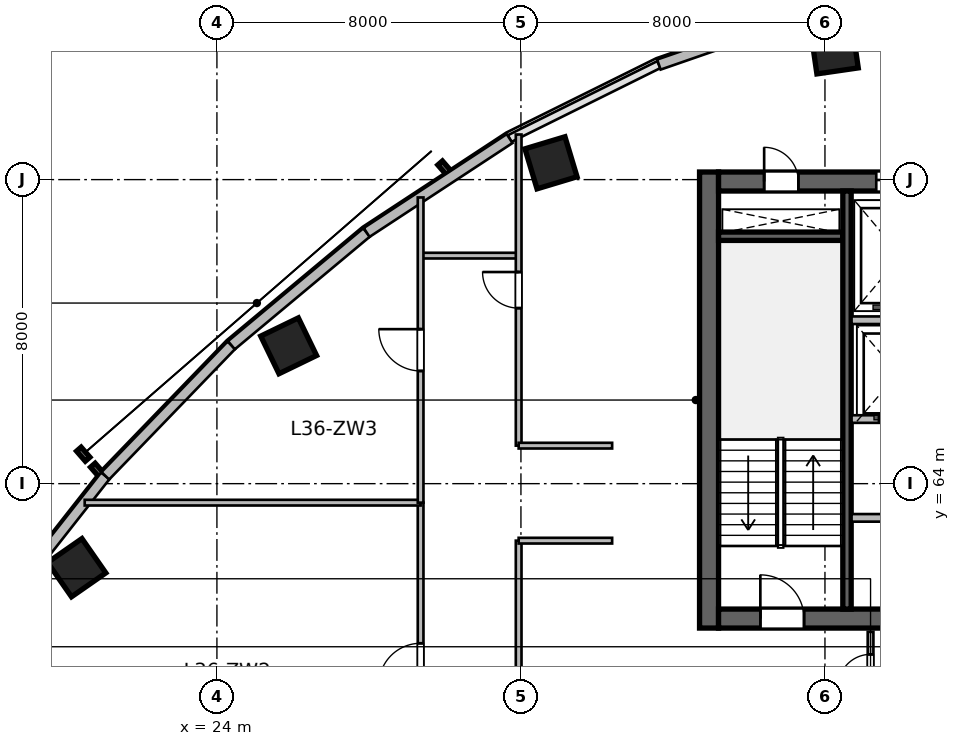
"""IFC4 building model, lengths in metres.
Left out: names, types, materials, properties, quantities, classifications, styles, units other than length and angle.
Written with IfcOpenShell. Run it as: python <this file> out.ifc"""

import sys

from ifc_helpers import new_model, si_unit, direction, frame, frame_2d, origin, origin_2d, place, context, subcontext, project, spatial, rectangle, extrude, source, transform, mapped, element, fill, save


model = new_model("IFC4")
c1 = context("Model", 3, precision=1e-05, world=origin(), true_north=direction((0.0, 1.0)))
c2 = subcontext(c1, "Body", "Model", "MODEL_VIEW")
j1 = project(units=[si_unit("LENGTHUNIT", "METRE"), si_unit("PLANEANGLEUNIT", "RADIAN")], contexts=[c1])
p1 = place(None, origin())
s1 = spatial("IfcSite", under=j1, at=p1, CompositionType="ELEMENT")
p2 = place(p1, origin())
s2 = spatial("IfcBuilding", under=s1, at=p2, CompositionType="ELEMENT")
p3 = place(p2, frame((0.0, 0.0, 150.6)))
s3 = spatial("IfcBuildingStorey", under=s2, at=p3, CompositionType="ELEMENT", Elevation=150.6)
m1 = source(origin(), c2, "Body", "SweptSolid", [
    extrude(rectangle(XDim=12.0, YDim=0.5, at=frame_2d((6.0, 0.0))), origin(), (0.0, 0.0, 1.0), 3.9),
])
p4 = place(p3, frame((36.95, 60.2, 0.0), z_axis=(0.0, 0.0, 1.0), x_axis=(0.0, 1.0, 0.0)))
e1 = element("IfcWall", 1, at=p4, inside=s3, PredefinedType="SHEAR", context=c2, shape_type="MappedRepresentation", body=[
    mapped(m1, transform((0.0, 0.0, 0.0), scale=1.0)),
])
m2 = source(origin(), c2, "Body", "SweptSolid", [
    extrude(rectangle(XDim=21.6, YDim=0.5, at=frame_2d((10.8, 0.0))), origin(), (0.0, 0.0, 1.0), 3.9),
])
p5 = place(p3, frame((37.2, 60.45, 0.0), z_axis=(0.0, 0.0, 1.0), x_axis=(1.0, 0.0, 0.0)))
e2 = element("IfcWall", 2, at=p5, inside=s3, PredefinedType="SHEAR", context=c2, shape_type="MappedRepresentation", body=[
    mapped(m2, transform((0.0, 0.0, 0.0), scale=1.0)),
])
p6 = place(p5, frame((1.1, 0.0, 0.0)))
e3 = element("IfcOpeningElement", 3, at=p6, cuts=e2, PredefinedType="OPENING", context=c2, shape_type="SweptSolid", body=[
    extrude(rectangle(XDim=1.15, YDim=2.15, at=frame_2d((0.575, 1.075))), frame((0.0, 0.26, 0.0), z_axis=(0.0, -1.0, 0.0), x_axis=(1.0, 0.0, 0.0)), (0.0, 0.0, 1.0), 0.52),
])
p7 = place(p5, frame((19.5, 0.0, 0.0)))
e4 = element("IfcOpeningElement", 4, at=p7, cuts=e2, PredefinedType="OPENING", context=c2, shape_type="SweptSolid", body=[
    extrude(rectangle(XDim=0.9, YDim=2.1, at=frame_2d((0.45, 1.05))), frame((0.0, 0.26, 0.0), z_axis=(0.0, -1.0, 0.0), x_axis=(1.0, 0.0, 0.0)), (0.0, 0.0, 1.0), 0.52),
])
p8 = place(p5, frame((12.02, 0.0, 0.0)))
e5 = element("IfcOpeningElement", 5, at=p8, cuts=e2, PredefinedType="OPENING", context=c2, shape_type="SweptSolid", body=[
    extrude(rectangle(XDim=1.6, YDim=2.15, at=frame_2d((0.8, 1.075))), frame((0.0, 0.26, 0.0), z_axis=(0.0, -1.0, 0.0), x_axis=(1.0, 0.0, 0.0)), (0.0, 0.0, 1.0), 0.52),
])
p9 = place(p3, frame((37.2, 71.95, 0.0), z_axis=(0.0, 0.0, 1.0), x_axis=(1.0, 0.0, 0.0)))
e6 = element("IfcWall", 6, at=p9, inside=s3, PredefinedType="SHEAR", context=c2, shape_type="MappedRepresentation", body=[
    mapped(m2, transform((0.0, 0.0, 0.0), scale=1.0)),
])
p10 = place(p9, frame((1.2, 0.0, 0.0)))
e7 = element("IfcOpeningElement", 7, at=p10, cuts=e6, PredefinedType="OPENING", context=c2, shape_type="SweptSolid", body=[
    extrude(rectangle(XDim=0.9, YDim=2.1, at=frame_2d((0.45, 1.05))), frame((0.0, 0.26, 0.0), z_axis=(0.0, -1.0, 0.0), x_axis=(1.0, 0.0, 0.0)), (0.0, 0.0, 1.0), 0.52),
])
p11 = place(p9, frame((14.7, 0.0, 0.0)))
e8 = element("IfcOpeningElement", 8, at=p11, cuts=e6, PredefinedType="OPENING", context=c2, shape_type="SweptSolid", body=[
    extrude(rectangle(XDim=1.2, YDim=2.15, at=frame_2d((0.6, 1.075))), frame((0.0, 0.26, 0.0), z_axis=(0.0, -1.0, 0.0), x_axis=(1.0, 0.0, 0.0)), (0.0, 0.0, 1.0), 0.52),
])
p12 = place(p9, frame((4.15, 0.0, 0.0)))
e9 = element("IfcOpeningElement", 9, at=p12, cuts=e6, PredefinedType="OPENING", context=c2, shape_type="SweptSolid", body=[
    extrude(rectangle(XDim=1.3, YDim=2.15, at=frame_2d((0.65, 1.075))), frame((0.0, 0.26, 0.0), z_axis=(0.0, -1.0, 0.0), x_axis=(1.0, 0.0, 0.0)), (0.0, 0.0, 1.0), 0.52),
])
p13 = place(p9, frame((7.25, 0.0, 0.0)))
e10 = element("IfcOpeningElement", 10, at=p13, cuts=e6, PredefinedType="OPENING", context=c2, shape_type="SweptSolid", body=[
    extrude(rectangle(XDim=0.9, YDim=2.1, at=frame_2d((0.45, 1.05))), frame((0.0, 0.26, 0.0), z_axis=(0.0, -1.0, 0.0), x_axis=(1.0, 0.0, 0.0)), (0.0, 0.0, 1.0), 0.52),
])
m3 = source(origin(), c2, "Body", "SweptSolid", [
    extrude(rectangle(XDim=3.27, YDim=0.22, at=frame_2d((1.635, 0.0))), origin(), (0.0, 0.0, 1.0), 3.9),
])
p14 = place(p3, frame((37.2, 70.51, 0.0), z_axis=(0.0, 0.0, 1.0), x_axis=(1.0, 0.0, 0.0)))
e11 = element("IfcWall", 11, at=p14, inside=s3, PredefinedType="SHEAR", context=c2, shape_type="MappedRepresentation", body=[
    mapped(m3, transform((0.0, 0.0, 0.0), scale=1.0)),
])
m4 = source(origin(), c2, "Body", "SweptSolid", [
    extrude(rectangle(XDim=11.0, YDim=0.22, at=frame_2d((5.5, 0.0))), origin(), (0.0, 0.0, 1.0), 3.9),
])
p15 = place(p3, frame((40.58, 60.7, 0.0), z_axis=(0.0, 0.0, 1.0), x_axis=(0.0, 1.0, 0.0)))
e12 = element("IfcWall", 12, at=p15, inside=s3, PredefinedType="SHEAR", context=c2, shape_type="MappedRepresentation", body=[
    mapped(m4, transform((0.0, 0.0, 0.0), scale=1.0)),
])
m5 = source(origin(), c2, "Body", "SweptSolid", [
    extrude(rectangle(XDim=1.1, YDim=1.1, at=origin_2d()), origin(), (0.0, 0.0, 1.0), 3.9),
])
for number, where, z_axis, x_axis in (
    (13, (20.311, 61.789, 0.0), (0.0, 0.0, 1.0), (-0.571, 0.821, 0.0)),
    (14, (25.888, 67.627, 0.0), (0.0, 0.0, 1.0), (-0.436, 0.9, 0.0)),
    (15, (32.791, 72.442, 0.0), (0.0, 0.0, 1.0), (-0.289, 0.957, 0.0)),
    (16, (40.253, 75.404, 0.0), (0.0, 0.0, 1.0), (-0.143, 0.99, 0.0)),
):
    element("IfcColumn", number, at=place(p3, frame(where, z_axis=z_axis, x_axis=x_axis)), inside=s3, PredefinedType="COLUMN", context=c2, shape_type="MappedRepresentation", body=[
        mapped(m5, transform((0.0, 0.0, 0.0), scale=1.0)),
    ])
m6 = source(origin(), c2, "Body", "SweptSolid", [
    extrude(rectangle(XDim=4.922, YDim=0.28, at=frame_2d((2.461, 0.0))), origin(), (0.0, 0.0, 1.0), 3.65),
])
p16 = place(p3, frame((18.021, 60.338, 0.0), z_axis=(0.0, 0.0, 1.0), x_axis=(0.61817639101, 0.786039407153, 0.0)))
e17 = element("IfcWall", 17, at=p16, inside=s3, PredefinedType="SOLIDWALL", context=c2, shape_type="MappedRepresentation", body=[
    mapped(m6, transform((0.0, 0.0, 0.0), scale=1.0)),
])
m7 = source(origin(), c2, "Body", "SweptSolid", [
    extrude(rectangle(XDim=4.776, YDim=0.28, at=frame_2d((2.388, 0.0))), origin(), (0.0, 0.0, 1.0), 3.65),
])
p17 = place(p3, frame((21.064, 64.206, 0.0), z_axis=(0.0, 0.0, 1.0), x_axis=(0.694601811851, 0.719394414055, 0.0)))
e18 = element("IfcWall", 18, at=p17, inside=s3, PredefinedType="SOLIDWALL", context=c2, shape_type="MappedRepresentation", body=[
    mapped(m7, transform((0.0, 0.0, 0.0), scale=1.0)),
])
m8 = source(origin(), c2, "Body", "SweptSolid", [
    extrude(rectangle(XDim=4.634, YDim=0.28, at=frame_2d((2.317, 0.0))), origin(), (0.0, 0.0, 1.0), 3.65),
])
p18 = place(p3, frame((24.381, 67.642, 0.0), z_axis=(0.0, 0.0, 1.0), x_axis=(0.767910229096, 0.640557475993, 0.0)))
e19 = element("IfcWall", 19, at=p18, inside=s3, PredefinedType="SOLIDWALL", context=c2, shape_type="MappedRepresentation", body=[
    mapped(m8, transform((0.0, 0.0, 0.0), scale=1.0)),
])
m9 = source(origin(), c2, "Body", "SweptSolid", [
    extrude(rectangle(XDim=4.501, YDim=0.28, at=frame_2d((2.25, 0.0))), origin(), (0.0, 0.0, 1.0), 3.65),
])
p19 = place(p3, frame((27.939, 70.61, 0.0), z_axis=(0.0, 0.0, 1.0), x_axis=(0.835984920737, 0.548752414391, 0.0)))
e20 = element("IfcWall", 20, at=p19, inside=s3, PredefinedType="SOLIDWALL", context=c2, shape_type="MappedRepresentation", body=[
    mapped(m9, transform((0.0, 0.0, 0.0), scale=1.0)),
])
m10 = source(origin(), c2, "Body", "SweptSolid", [
    extrude(rectangle(XDim=4.29, YDim=0.28, at=frame_2d((2.145, 0.0))), origin(), (0.0, 0.0, 1.0), 3.65),
])
p20 = place(p3, frame((35.63, 75.027, 0.0), z_axis=(0.0, 0.0, 1.0), x_axis=(0.944883859218, 0.3274057003, 0.0)))
e21 = element("IfcWall", 21, at=p20, inside=s3, PredefinedType="SOLIDWALL", context=c2, shape_type="MappedRepresentation", body=[
    mapped(m10, transform((0.0, 0.0, 0.0), scale=1.0)),
])
m11 = source(origin(), c2, "Body", "SweptSolid", [
    extrude(rectangle(XDim=8.8, YDim=0.2, at=frame_2d((4.4, 0.0))), origin(), (0.0, 0.0, 1.0), 3.65),
])
p21 = place(p3, frame((40.7, 68.3, 0.0), z_axis=(0.0, 0.0, 1.0), x_axis=(1.0, 0.0, 0.0)))
e22 = element("IfcWall", 22, at=p21, inside=s3, PredefinedType="SOLIDWALL", context=c2, shape_type="MappedRepresentation", body=[
    mapped(m11, transform((0.0, 0.0, 0.0), scale=1.0)),
])
m12 = source(origin(), c2, "Body", "SweptSolid", [
    extrude(rectangle(XDim=8.02, YDim=0.2, at=frame_2d((4.01, 0.0))), origin(), (0.0, 0.0, 1.0), 3.65),
])
p22 = place(p3, frame((40.7, 63.1, 0.0), z_axis=(0.0, 0.0, 1.0), x_axis=(1.0, 0.0, 0.0)))
e23 = element("IfcWall", 23, at=p22, inside=s3, PredefinedType="SOLIDWALL", context=c2, shape_type="MappedRepresentation", body=[
    mapped(m12, transform((0.0, 0.0, 0.0), scale=1.0)),
])
p23 = place(p22, frame((1.6, 0.0, 0.0)))
e24 = element("IfcOpeningElement", 24, at=p23, cuts=e23, PredefinedType="OPENING", context=c2, shape_type="SweptSolid", body=[
    extrude(rectangle(XDim=0.9, YDim=2.1, at=frame_2d((0.45, 1.05))), frame((0.0, 0.11, 0.0), z_axis=(0.0, -1.0, 0.0), x_axis=(1.0, 0.0, 0.0)), (0.0, 0.0, 1.0), 0.22),
])
p24 = place(p22, frame((5.54, 0.0, 0.0)))
e25 = element("IfcOpeningElement", 25, at=p24, cuts=e23, PredefinedType="OPENING", context=c2, shape_type="SweptSolid", body=[
    extrude(rectangle(XDim=0.9, YDim=2.1, at=frame_2d((0.45, 1.05))), frame((0.0, 0.11, 0.0), z_axis=(0.0, -1.0, 0.0), x_axis=(1.0, 0.0, 0.0)), (0.0, 0.0, 1.0), 0.22),
])
p25 = place(p3, frame((40.7, 65.7, 0.0), z_axis=(0.0, 0.0, 1.0), x_axis=(1.0, 0.0, 0.0)))
e26 = element("IfcWall", 26, at=p25, inside=s3, PredefinedType="SOLIDWALL", context=c2, shape_type="MappedRepresentation", body=[
    mapped(m11, transform((0.0, 0.0, 0.0), scale=1.0)),
])
p26 = place(p25, frame((0.72, 0.0, 0.0)))
e27 = element("IfcOpeningElement", 27, at=p26, cuts=e26, PredefinedType="OPENING", context=c2, shape_type="SweptSolid", body=[
    extrude(rectangle(XDim=1.0, YDim=2.15, at=frame_2d((0.5, 1.075))), frame((0.0, 0.11, 0.0), z_axis=(0.0, -1.0, 0.0), x_axis=(1.0, 0.0, 0.0)), (0.0, 0.0, 1.0), 0.22),
])
p27 = place(p25, frame((2.62, 0.0, 0.0)))
e28 = element("IfcOpeningElement", 28, at=p27, cuts=e26, PredefinedType="OPENING", context=c2, shape_type="SweptSolid", body=[
    extrude(rectangle(XDim=1.0, YDim=2.15, at=frame_2d((0.5, 1.075))), frame((0.0, 0.11, 0.0), z_axis=(0.0, -1.0, 0.0), x_axis=(1.0, 0.0, 0.0)), (0.0, 0.0, 1.0), 0.22),
])
p28 = place(p25, frame((4.55, 0.0, 0.0)))
e29 = element("IfcOpeningElement", 29, at=p28, cuts=e26, PredefinedType="OPENING", context=c2, shape_type="SweptSolid", body=[
    extrude(rectangle(XDim=1.0, YDim=2.15, at=frame_2d((0.5, 1.075))), frame((0.0, 0.11, 0.0), z_axis=(0.0, -1.0, 0.0), x_axis=(1.0, 0.0, 0.0)), (0.0, 0.0, 1.0), 0.22),
])
p29 = place(p25, frame((6.55, 0.0, 0.0)))
e30 = element("IfcOpeningElement", 30, at=p29, cuts=e26, PredefinedType="OPENING", context=c2, shape_type="SweptSolid", body=[
    extrude(rectangle(XDim=1.0, YDim=2.15, at=frame_2d((0.5, 1.075))), frame((0.0, 0.11, 0.0), z_axis=(0.0, -1.0, 0.0), x_axis=(1.0, 0.0, 0.0)), (0.0, 0.0, 1.0), 0.22),
])
m13 = source(origin(), c2, "Body", "SweptSolid", [
    extrude(rectangle(XDim=2.033, YDim=0.15, at=frame_2d((1.016, 0.0))), origin(), (0.0, 0.0, 1.0), 3.65),
])
p30 = place(p3, frame((41.2, 58.067, 0.0), z_axis=(0.0, 0.0, 1.0), x_axis=(0.0, 1.0, 0.0)))
e31 = element("IfcWall", 31, at=p30, inside=s3, PredefinedType="PARTITIONING", context=c2, shape_type="MappedRepresentation", body=[
    mapped(m13, transform((0.0, 0.0, 0.0), scale=1.0)),
])
p31 = place(p30, frame((0.591, 0.0, 0.0)))
e32 = element("IfcOpeningElement", 32, at=p31, cuts=e31, PredefinedType="OPENING", context=c2, shape_type="SweptSolid", body=[
    extrude(rectangle(XDim=0.85, YDim=2.1, at=frame_2d((0.425, 1.05))), frame((0.0, 0.085, 0.0), z_axis=(0.0, -1.0, 0.0), x_axis=(1.0, 0.0, 0.0)), (0.0, 0.0, 1.0), 0.17),
])
m14 = source(origin(), c2, "Body", "SweptSolid", [
    extrude(rectangle(XDim=2.5, YDim=0.15, at=frame_2d((1.25, 0.0))), origin(), (0.0, 0.0, 1.0), 3.65),
])
p32 = place(p3, frame((29.4, 70.0, 0.0), z_axis=(0.0, 0.0, 1.0), x_axis=(1.0, 0.0, 0.0)))
e33 = element("IfcWall", 33, at=p32, inside=s3, PredefinedType="PARTITIONING", context=c2, shape_type="MappedRepresentation", body=[
    mapped(m14, transform((0.0, 0.0, 0.0), scale=1.0)),
])
m15 = source(origin(), c2, "Body", "SweptSolid", [
    extrude(rectangle(XDim=8.5, YDim=0.15, at=frame_2d((4.25, 0.0))), origin(), (0.0, 0.0, 1.0), 2.942),
])
p33 = place(p3, frame((29.36, 55.0, 0.0), z_axis=(0.0, 0.0, 1.0), x_axis=(0.0, 1.0, 0.0)))
e34 = element("IfcWall", 34, at=p33, inside=s3, PredefinedType="PARTITIONING", context=c2, shape_type="MappedRepresentation", body=[
    mapped(m15, transform((0.0, 0.0, 0.0), scale=1.0)),
])
p34 = place(p33, frame((3.7, 0.0, 0.0)))
e35 = element("IfcOpeningElement", 35, at=p34, cuts=e34, PredefinedType="OPENING", context=c2, shape_type="SweptSolid", body=[
    extrude(rectangle(XDim=1.1, YDim=2.15, at=frame_2d((0.55, 1.075))), frame((0.0, 0.085, 0.0), z_axis=(0.0, -1.0, 0.0), x_axis=(1.0, 0.0, 0.0)), (0.0, 0.0, 1.0), 0.17),
])
m16 = source(origin(), c2, "Body", "SweptSolid", [
    extrude(rectangle(XDim=8.839, YDim=0.15, at=frame_2d((4.419, 0.0))), origin(), (0.0, 0.0, 1.0), 3.65),
])
p35 = place(p3, frame((20.521, 63.5, 0.0), z_axis=(0.0, 0.0, 1.0), x_axis=(1.0, 0.0, 0.0)))
e36 = element("IfcWall", 36, at=p35, inside=s3, PredefinedType="PARTITIONING", context=c2, shape_type="MappedRepresentation", body=[
    mapped(m16, transform((0.0, 0.0, 0.0), scale=1.0)),
])
m17 = source(origin(), c2, "Body", "SweptSolid", [
    extrude(rectangle(XDim=8.031, YDim=0.15, at=frame_2d((4.015, 0.0))), origin(), (0.0, 0.0, 1.0), 3.65),
])
p36 = place(p3, frame((29.36, 63.5, 0.0), z_axis=(0.0, 0.0, 1.0), x_axis=(0.0, 1.0, 0.0)))
e37 = element("IfcWall", 37, at=p36, inside=s3, PredefinedType="PARTITIONING", context=c2, shape_type="MappedRepresentation", body=[
    mapped(m17, transform((0.0, 0.0, 0.0), scale=1.0)),
])
p37 = place(p36, frame((3.465, 0.0, 0.0)))
e38 = element("IfcOpeningElement", 38, at=p37, cuts=e37, PredefinedType="OPENING", context=c2, shape_type="SweptSolid", body=[
    extrude(rectangle(XDim=1.1, YDim=2.15, at=frame_2d((0.55, 1.075))), frame((0.0, 0.085, 0.0), z_axis=(0.0, -1.0, 0.0), x_axis=(1.0, 0.0, 0.0)), (0.0, 0.0, 1.0), 0.17),
])
m18 = source(origin(), c2, "Body", "SweptSolid", [
    extrude(rectangle(XDim=15.598, YDim=0.15, at=frame_2d((7.799, 0.0))), origin(), (0.0, 0.0, 1.0), 2.942),
])
p38 = place(p3, frame((31.94, 46.902, 0.0), z_axis=(0.0, 0.0, 1.0), x_axis=(0.0, 1.0, 0.0)))
e39 = element("IfcWall", 39, at=p38, inside=s3, PredefinedType="PARTITIONING", context=c2, shape_type="MappedRepresentation", body=[
    mapped(m18, transform((0.0, 0.0, 0.0), scale=1.0)),
])
p39 = place(p38, frame((7.324, 0.0, 0.0)))
e40 = element("IfcOpeningElement", 40, at=p39, cuts=e39, PredefinedType="OPENING", context=c2, shape_type="SweptSolid", body=[
    extrude(rectangle(XDim=0.95, YDim=2.1, at=frame_2d((0.475, 1.05))), frame((0.0, 0.085, 0.0), z_axis=(0.0, -1.0, 0.0), x_axis=(1.0, 0.0, 0.0)), (0.0, 0.0, 1.0), 0.17),
])
m19 = source(origin(), c2, "Body", "SweptSolid", [
    extrude(rectangle(XDim=2.46, YDim=0.15, at=frame_2d((1.23, 0.0))), origin(), (0.0, 0.0, 1.0), 3.65),
])
p40 = place(p3, frame((31.94, 62.5, 0.0), z_axis=(0.0, 0.0, 1.0), x_axis=(1.0, 0.0, 0.0)))
e41 = element("IfcWall", 41, at=p40, inside=s3, PredefinedType="PARTITIONING", context=c2, shape_type="MappedRepresentation", body=[
    mapped(m19, transform((0.0, 0.0, 0.0), scale=1.0)),
])
m20 = source(origin(), c2, "Body", "SweptSolid", [
    extrude(rectangle(XDim=8.187, YDim=0.15, at=frame_2d((4.093, 0.0))), origin(), (0.0, 0.0, 1.0), 3.65),
])
p41 = place(p3, frame((31.94, 65.0, 0.0), z_axis=(0.0, 0.0, 1.0), x_axis=(0.0, 1.0, 0.0)))
e42 = element("IfcWall", 42, at=p41, inside=s3, PredefinedType="PARTITIONING", context=c2, shape_type="MappedRepresentation", body=[
    mapped(m20, transform((0.0, 0.0, 0.0), scale=1.0)),
])
p42 = place(p41, frame((3.618, 0.0, 0.0)))
e43 = element("IfcOpeningElement", 43, at=p42, cuts=e42, PredefinedType="OPENING", context=c2, shape_type="SweptSolid", body=[
    extrude(rectangle(XDim=0.95, YDim=2.1, at=frame_2d((0.475, 1.05))), frame((0.0, 0.085, 0.0), z_axis=(0.0, -1.0, 0.0), x_axis=(1.0, 0.0, 0.0)), (0.0, 0.0, 1.0), 0.17),
])
p43 = place(p3, frame((31.94, 65.0, 0.0), z_axis=(0.0, 0.0, 1.0), x_axis=(1.0, 0.0, 0.0)))
e44 = element("IfcWall", 44, at=p43, inside=s3, PredefinedType="PARTITIONING", context=c2, shape_type="MappedRepresentation", body=[
    mapped(m19, transform((0.0, 0.0, 0.0), scale=1.0)),
])
m21 = source(origin(), c2, "Body", "SweptSolid", [
    extrude(rectangle(XDim=1.15, YDim=2.15, at=frame_2d((0.575, 1.075))), frame((0.0, 0.025, 0.0), z_axis=(0.0, -1.0, 0.0), x_axis=(1.0, 0.0, 0.0)), (0.0, 0.0, 1.0), 0.05),
])
p44 = place(p6, origin())
e45 = element("IfcDoor", 45, at=p44, inside=s3, OperationType="SINGLE_SWING_LEFT", PredefinedType="DOOR", context=c2, shape_type="MappedRepresentation", body=[
    mapped(m21, transform((0.0, 0.0, 0.0), scale=1.0)),
])
fill(e3, e45)
m22 = source(origin(), c2, "Body", "SweptSolid", [
    extrude(rectangle(XDim=0.9, YDim=2.1, at=frame_2d((0.45, 1.05))), frame((0.0, 0.025, 0.0), z_axis=(0.0, -1.0, 0.0), x_axis=(1.0, 0.0, 0.0)), (0.0, 0.0, 1.0), 0.05),
])
p45 = place(p10, origin())
e46 = element("IfcDoor", 46, at=p45, inside=s3, OperationType="SINGLE_SWING_LEFT", PredefinedType="DOOR", context=c2, shape_type="MappedRepresentation", body=[
    mapped(m22, transform((0.0, 0.0, 0.0), scale=1.0)),
])
fill(e7, e46)
m23 = source(origin(), c2, "Body", "SweptSolid", [
    extrude(rectangle(XDim=1.3, YDim=2.15, at=frame_2d((0.65, 1.075))), frame((0.0, 0.025, 0.0), z_axis=(0.0, -1.0, 0.0), x_axis=(1.0, 0.0, 0.0)), (0.0, 0.0, 1.0), 0.05),
])
p46 = place(p12, origin())
e47 = element("IfcDoor", 47, at=p46, inside=s3, OperationType="DOUBLE_DOOR_SLIDING", PredefinedType="DOOR", context=c2, shape_type="MappedRepresentation", body=[
    mapped(m23, transform((0.0, 0.0, 0.0), scale=1.0)),
])
fill(e9, e47)
m24 = source(origin(), c2, "Body", "SweptSolid", [
    extrude(rectangle(XDim=1.0, YDim=2.15, at=frame_2d((0.5, 1.075))), frame((0.0, 0.025, 0.0), z_axis=(0.0, -1.0, 0.0), x_axis=(1.0, 0.0, 0.0)), (0.0, 0.0, 1.0), 0.05),
])
p47 = place(p26, origin())
e48 = element("IfcDoor", 48, at=p47, inside=s3, OperationType="DOUBLE_DOOR_SLIDING", PredefinedType="DOOR", context=c2, shape_type="MappedRepresentation", body=[
    mapped(m24, transform((0.0, 0.0, 0.0), scale=1.0)),
])
fill(e27, e48)
m25 = source(origin(), c2, "Body", "SweptSolid", [
    extrude(rectangle(XDim=0.85, YDim=2.1, at=frame_2d((0.425, 1.05))), frame((0.0, 0.025, 0.0), z_axis=(0.0, -1.0, 0.0), x_axis=(1.0, 0.0, 0.0)), (0.0, 0.0, 1.0), 0.05),
])
p48 = place(p31, origin())
e49 = element("IfcDoor", 49, at=p48, inside=s3, OperationType="SINGLE_SWING_LEFT", PredefinedType="DOOR", context=c2, shape_type="MappedRepresentation", body=[
    mapped(m25, transform((0.0, 0.0, 0.0), scale=1.0)),
])
fill(e32, e49)
m26 = source(origin(), c2, "Body", "SweptSolid", [
    extrude(rectangle(XDim=1.1, YDim=2.15, at=frame_2d((0.55, 1.075))), frame((0.0, 0.025, 0.0), z_axis=(0.0, -1.0, 0.0), x_axis=(1.0, 0.0, 0.0)), (0.0, 0.0, 1.0), 0.05),
])
p49 = place(p34, origin())
e50 = element("IfcDoor", 50, at=p49, inside=s3, OperationType="SINGLE_SWING_LEFT", PredefinedType="DOOR", context=c2, shape_type="MappedRepresentation", body=[
    mapped(m26, transform((0.0, 0.0, 0.0), scale=1.0)),
])
fill(e35, e50)
p50 = place(p37, origin())
e51 = element("IfcDoor", 51, at=p50, inside=s3, OperationType="SINGLE_SWING_RIGHT", PredefinedType="DOOR", context=c2, shape_type="MappedRepresentation", body=[
    mapped(m26, transform((0.0, 0.0, 0.0), scale=1.0)),
])
fill(e38, e51)
m27 = source(origin(), c2, "Body", "SweptSolid", [
    extrude(rectangle(XDim=0.95, YDim=2.1, at=frame_2d((0.475, 1.05))), frame((0.0, 0.025, 0.0), z_axis=(0.0, -1.0, 0.0), x_axis=(1.0, 0.0, 0.0)), (0.0, 0.0, 1.0), 0.05),
])
p51 = place(p42, origin())
e52 = element("IfcDoor", 52, at=p51, inside=s3, OperationType="SINGLE_SWING_RIGHT", PredefinedType="DOOR", context=c2, shape_type="MappedRepresentation", body=[
    mapped(m27, transform((0.0, 0.0, 0.0), scale=1.0)),
])
fill(e43, e52)
save(model, sys.argv[1])
